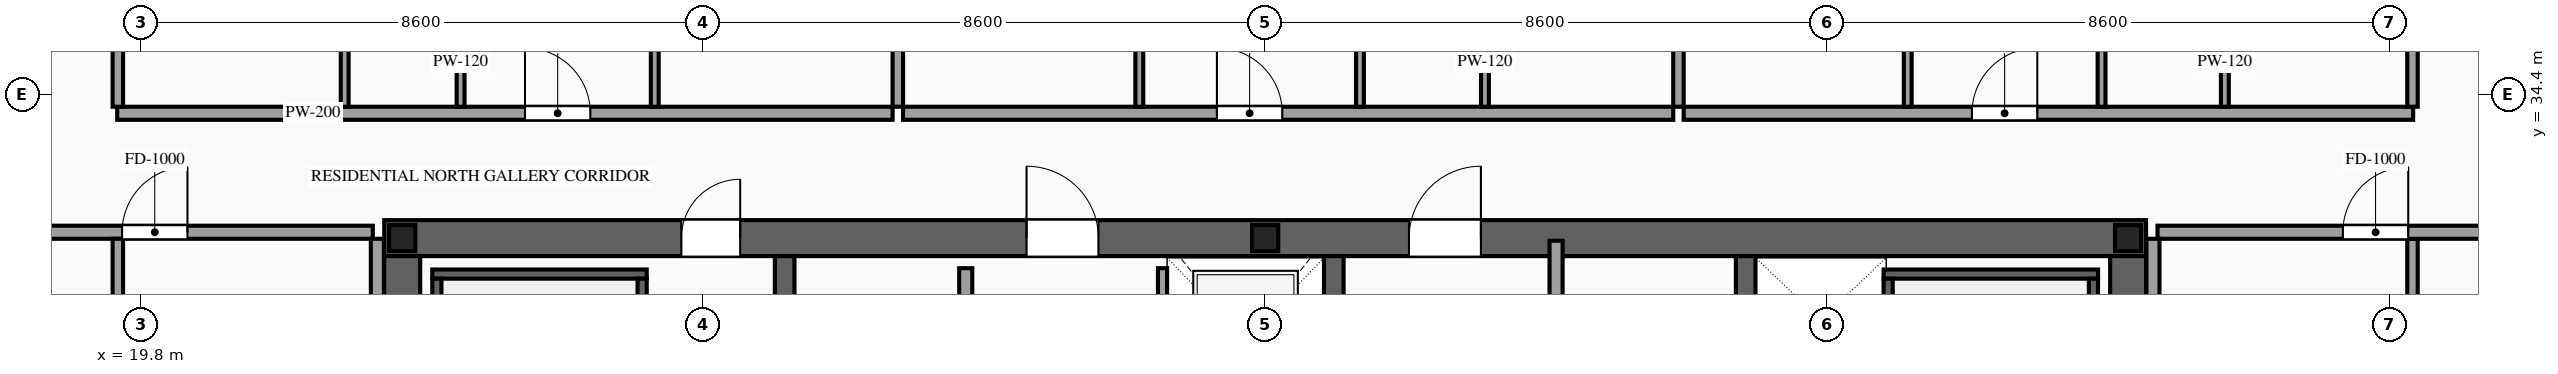
"""IFC4 building model, lengths in metres.
Left out: names, types, materials, properties, quantities, classifications, styles, units other than length and angle.
Written with IfcOpenShell. Run it as: python <this file> out.ifc"""

import sys

from ifc_helpers import new_model, si_unit, direction, frame, frame_2d, origin, origin_2d, place, context, subcontext, project, spatial, rectangle, i_section, extrude, source, transform, mapped, element, fill, save


model = new_model("IFC4")
c1 = context("Model", 3, precision=1e-05, world=origin(), true_north=direction((0.0, 1.0)))
c2 = subcontext(c1, "Body", "Model", "MODEL_VIEW")
j1 = project(units=[si_unit("LENGTHUNIT", "METRE"), si_unit("PLANEANGLEUNIT", "RADIAN")], contexts=[c1])
p1 = place(None, origin())
s1 = spatial("IfcSite", under=j1, at=p1, CompositionType="ELEMENT")
p2 = place(p1, origin())
s2 = spatial("IfcBuilding", under=s1, at=p2, CompositionType="ELEMENT")
p3 = place(p2, frame((0.0, 0.0, 245.1)))
s3 = spatial("IfcBuildingStorey", under=s2, at=p3, CompositionType="ELEMENT", Elevation=245.1)
p4 = place(p3, frame((23.525, 32.2, 0.0), z_axis=(0.0, 0.0, 1.0), x_axis=(1.0, 0.0, 0.0)))
e1 = element("IfcWall", 1, at=p4, inside=s3, PredefinedType="SHEAR", context=c2, shape_type="SweptSolid", body=[
    extrude(rectangle(XDim=26.95, YDim=0.55, at=frame_2d((13.475, 0.0))), origin(), (0.0, 0.0, 1.0), 3.5),
])
p5 = place(p4, frame((4.545, 0.0, 0.0)))
e2 = element("IfcOpeningElement", 2, at=p5, cuts=e1, PredefinedType="OPENING", context=c2, shape_type="SweptSolid", body=[
    extrude(rectangle(XDim=0.9, YDim=2.15, at=frame_2d((0.45, 1.075))), frame((0.0, 0.29, 0.0), z_axis=(0.0, -1.0, 0.0), x_axis=(1.0, 0.0, 0.0)), (0.0, 0.0, 1.0), 0.58),
])
p6 = place(p4, frame((9.825, 0.0, 0.0)))
e3 = element("IfcOpeningElement", 3, at=p6, cuts=e1, PredefinedType="OPENING", context=c2, shape_type="SweptSolid", body=[
    extrude(rectangle(XDim=1.1, YDim=2.2, at=frame_2d((0.55, 1.1))), frame((0.0, 0.29, 0.0), z_axis=(0.0, -1.0, 0.0), x_axis=(1.0, 0.0, 0.0)), (0.0, 0.0, 1.0), 0.58),
])
p7 = place(p4, frame((15.675, 0.0, 0.0)))
e4 = element("IfcOpeningElement", 4, at=p7, cuts=e1, PredefinedType="OPENING", context=c2, shape_type="SweptSolid", body=[
    extrude(rectangle(XDim=1.1, YDim=2.2, at=frame_2d((0.55, 1.1))), frame((0.0, 0.29, 0.0), z_axis=(0.0, -1.0, 0.0), x_axis=(1.0, 0.0, 0.0)), (0.0, 0.0, 1.0), 0.58),
])
m1 = source(origin(), c2, "Body", "SweptSolid", [
    extrude(rectangle(XDim=12.25, YDim=0.55, at=frame_2d((6.125, 0.0))), origin(), (0.0, 0.0, 1.0), 3.5),
])
for number, where, z_axis, x_axis in (
    (5, (23.8, 19.675, 0.0), (0.0, 0.0, 1.0), (0.0, 1.0, 0.0)),
    (6, (50.2, 19.675, 0.0), (0.0, 0.0, 1.0), (0.0, 1.0, 0.0)),
):
    element("IfcWall", number, at=place(p3, frame(where, z_axis=z_axis, x_axis=x_axis)), inside=s3, PredefinedType="SHEAR", context=c2, shape_type="MappedRepresentation", body=[
        mapped(m1, transform((0.0, 0.0, 0.0), scale=1.0)),
    ])
m2 = source(origin(), c2, "Body", "SweptSolid", [
    extrude(rectangle(XDim=12.25, YDim=0.3, at=frame_2d((6.125, 0.0))), origin(), (0.0, 0.0, 1.0), 3.5),
])
for number, where, z_axis, x_axis in (
    (7, (29.65, 19.675, 0.0), (0.0, 0.0, 1.0), (0.0, 1.0, 0.0)),
    (8, (38.05, 19.675, 0.0), (0.0, 0.0, 1.0), (0.0, 1.0, 0.0)),
    (9, (44.35, 19.675, 0.0), (0.0, 0.0, 1.0), (0.0, 1.0, 0.0)),
):
    element("IfcWall", number, at=place(p3, frame(where, z_axis=z_axis, x_axis=x_axis)), inside=s3, PredefinedType="SOLIDWALL", context=c2, shape_type="MappedRepresentation", body=[
        mapped(m2, transform((0.0, 0.0, 0.0), scale=1.0)),
    ])
m3 = source(origin(), c2, "Body", "SweptSolid", [
    extrude(i_section(OverallWidth=0.4, OverallDepth=0.4, WebThickness=0.013, FlangeThickness=0.021, at=origin_2d()), origin(), (0.0, 0.0, 1.0), 3.5),
])
for number, where, z_axis, x_axis in (
    (10, (23.8, 32.2, 0.0), (0.0, 0.0, 1.0), (1.0, 0.0, 0.0)),
    (11, (37.0, 32.2, 0.0), (0.0, 0.0, 1.0), (1.0, 0.0, 0.0)),
    (12, (50.2, 32.2, 0.0), (0.0, 0.0, 1.0), (1.0, 0.0, 0.0)),
):
    element("IfcColumn", number, at=place(p3, frame(where, z_axis=z_axis, x_axis=x_axis)), inside=s3, PredefinedType="COLUMN", context=c2, shape_type="MappedRepresentation", body=[
        mapped(m3, transform((0.0, 0.0, 0.0), scale=1.0)),
    ])
p8 = place(p3, frame((35.43, 29.4, 0.0), z_axis=(0.0, 0.0, 1.0), x_axis=(0.0, 1.0, 0.0)))
e13 = element("IfcWall", 13, at=p8, inside=s3, PredefinedType="SOLIDWALL", context=c2, shape_type="SweptSolid", body=[
    extrude(rectangle(XDim=2.34, YDim=0.14, at=frame_2d((1.17, 0.0))), origin(), (0.0, 0.0, 1.0), 3.28),
])
p9 = place(p8, frame((0.62, 0.0, 0.0)))
e14 = element("IfcOpeningElement", 14, at=p9, cuts=e13, PredefinedType="OPENING", context=c2, shape_type="SweptSolid", body=[
    extrude(rectangle(XDim=1.1, YDim=2.2, at=frame_2d((0.55, 1.1))), frame((0.0, 0.085, 0.0), z_axis=(0.0, -1.0, 0.0), x_axis=(1.0, 0.0, 0.0)), (0.0, 0.0, 1.0), 0.17),
])
m4 = source(origin(), c2, "Body", "SweptSolid", [
    extrude(rectangle(XDim=3.28, YDim=0.14, at=frame_2d((1.64, 0.0))), origin(), (0.0, 0.0, 1.0), 3.28),
])
p10 = place(p3, frame((24.26, 31.65, 0.0), z_axis=(0.0, 0.0, 1.0), x_axis=(1.0, 0.0, 0.0)))
e15 = element("IfcWall", 15, at=p10, inside=s3, PredefinedType="SOLIDWALL", context=c2, shape_type="MappedRepresentation", body=[
    mapped(m4, transform((0.0, 0.0, 0.0), scale=1.0)),
])
m5 = source(origin(), c2, "Body", "SweptSolid", [
    extrude(rectangle(XDim=8.94, YDim=0.14, at=frame_2d((4.47, 0.0))), origin(), (0.0, 0.0, 1.0), 3.28),
])
for number, where, z_axis, x_axis in (
    (16, (24.33, 22.64, 0.0), (0.0, 0.0, 1.0), (0.0, 1.0, 0.0)),
    (17, (27.47, 22.64, 0.0), (0.0, 0.0, 1.0), (0.0, 1.0, 0.0)),
):
    element("IfcWall", number, at=place(p3, frame(where, z_axis=z_axis, x_axis=x_axis)), inside=s3, PredefinedType="SOLIDWALL", context=c2, shape_type="MappedRepresentation", body=[
        mapped(m5, transform((0.0, 0.0, 0.0), scale=1.0)),
    ])
p11 = place(p3, frame((46.46, 31.65, 0.0), z_axis=(0.0, 0.0, 1.0), x_axis=(1.0, 0.0, 0.0)))
e18 = element("IfcWall", 18, at=p11, inside=s3, PredefinedType="SOLIDWALL", context=c2, shape_type="MappedRepresentation", body=[
    mapped(m4, transform((0.0, 0.0, 0.0), scale=1.0)),
])
for number, where, z_axis, x_axis in (
    (19, (46.53, 22.64, 0.0), (0.0, 0.0, 1.0), (0.0, 1.0, 0.0)),
    (20, (49.67, 22.64, 0.0), (0.0, 0.0, 1.0), (0.0, 1.0, 0.0)),
):
    element("IfcWall", number, at=place(p3, frame(where, z_axis=z_axis, x_axis=x_axis)), inside=s3, PredefinedType="SOLIDWALL", context=c2, shape_type="MappedRepresentation", body=[
        mapped(m5, transform((0.0, 0.0, 0.0), scale=1.0)),
    ])
p12 = place(p3, frame((32.42, 19.86, 0.0), z_axis=(0.0, 0.0, 1.0), x_axis=(0.0, 1.0, 0.0)))
e21 = element("IfcWall", 21, at=p12, inside=s3, PredefinedType="PARTITIONING", context=c2, shape_type="SweptSolid", body=[
    extrude(rectangle(XDim=11.88, YDim=0.2, at=frame_2d((5.94, 0.0))), origin(), (0.0, 0.0, 1.0), 3.28),
])
p13 = place(p12, frame((5.49, 0.0, 0.0)))
e22 = element("IfcOpeningElement", 22, at=p13, cuts=e21, PredefinedType="OPENING", context=c2, shape_type="SweptSolid", body=[
    extrude(rectangle(XDim=0.9, YDim=2.15, at=frame_2d((0.45, 1.075))), frame((0.0, 0.115, 0.0), z_axis=(0.0, -1.0, 0.0), x_axis=(1.0, 0.0, 0.0)), (0.0, 0.0, 1.0), 0.23),
])
m6 = source(origin(), c2, "Body", "SweptSolid", [
    extrude(rectangle(XDim=12.72, YDim=0.2, at=frame_2d((6.36, 0.0))), origin(), (0.0, 0.0, 1.0), 3.28),
])
p14 = place(p3, frame((41.45, 19.44, 0.0), z_axis=(0.0, 0.0, 1.0), x_axis=(0.0, 1.0, 0.0)))
e23 = element("IfcWall", 23, at=p14, inside=s3, PredefinedType="PARTITIONING", context=c2, shape_type="MappedRepresentation", body=[
    mapped(m6, transform((0.0, 0.0, 0.0), scale=1.0)),
])
p15 = place(p3, frame((19.44, 34.11, 0.0), z_axis=(0.0, 0.0, 1.0), x_axis=(1.0, 0.0, 0.0)))
e24 = element("IfcWall", 24, at=p15, inside=s3, PredefinedType="PARTITIONING", context=c2, shape_type="SweptSolid", body=[
    extrude(rectangle(XDim=11.861, YDim=0.2, at=frame_2d((5.931, 0.0))), origin(), (0.0, 0.0, 1.0), 3.28),
])
p16 = place(p15, frame((6.238, 0.0, 0.0)))
e25 = element("IfcOpeningElement", 25, at=p16, cuts=e24, PredefinedType="OPENING", context=c2, shape_type="SweptSolid", body=[
    extrude(rectangle(XDim=1.0, YDim=2.2, at=frame_2d((0.5, 1.1))), frame((0.0, 0.115, 0.0), z_axis=(0.0, -1.0, 0.0), x_axis=(1.0, 0.0, 0.0)), (0.0, 0.0, 1.0), 0.23),
])
m7 = source(origin(), c2, "Body", "SweptSolid", [
    extrude(rectangle(XDim=12.04, YDim=0.16, at=frame_2d((6.02, 0.0))), origin(), (0.0, 0.0, 1.0), 3.28),
])
p17 = place(p3, frame((31.381, 34.21, 0.0), z_axis=(0.0, 0.0, 1.0), x_axis=(0.0, 1.0, 0.0)))
e26 = element("IfcWall", 26, at=p17, inside=s3, PredefinedType="PARTITIONING", context=c2, shape_type="MappedRepresentation", body=[
    mapped(m7, transform((0.0, 0.0, 0.0), scale=1.0)),
])
m8 = source(origin(), c2, "Body", "SweptSolid", [
    extrude(rectangle(XDim=4.11, YDim=0.12, at=frame_2d((2.055, 0.0))), origin(), (0.0, 0.0, 1.0), 3.28),
])
p18 = place(p3, frame((22.92, 34.21, 0.0), z_axis=(0.0, 0.0, 1.0), x_axis=(0.0, 1.0, 0.0)))
e27 = element("IfcWall", 27, at=p18, inside=s3, PredefinedType="PARTITIONING", context=c2, shape_type="MappedRepresentation", body=[
    mapped(m8, transform((0.0, 0.0, 0.0), scale=1.0)),
])
p19 = place(p3, frame((24.693, 34.21, 0.0), z_axis=(0.0, 0.0, 1.0), x_axis=(0.0, 1.0, 0.0)))
e28 = element("IfcWall", 28, at=p19, inside=s3, PredefinedType="PARTITIONING", context=c2, shape_type="SweptSolid", body=[
    extrude(rectangle(XDim=4.11, YDim=0.12, at=frame_2d((2.055, 0.0))), origin(), (0.0, 0.0, 1.0), 3.28),
])
p20 = place(p19, frame((1.63, 0.0, 0.0)))
e29 = element("IfcOpeningElement", 29, at=p20, cuts=e28, PredefinedType="OPENING", context=c2, shape_type="SweptSolid", body=[
    extrude(rectangle(XDim=0.85, YDim=2.1, at=frame_2d((0.425, 1.05))), frame((0.0, 0.075, 0.0), z_axis=(0.0, -1.0, 0.0), x_axis=(1.0, 0.0, 0.0)), (0.0, 0.0, 1.0), 0.15),
])
p21 = place(p3, frame((27.663, 34.21, 0.0), z_axis=(0.0, 0.0, 1.0), x_axis=(0.0, 1.0, 0.0)))
e30 = element("IfcWall", 30, at=p21, inside=s3, PredefinedType="PARTITIONING", context=c2, shape_type="MappedRepresentation", body=[
    mapped(m8, transform((0.0, 0.0, 0.0), scale=1.0)),
])
p22 = place(p3, frame((31.461, 34.11, 0.0), z_axis=(0.0, 0.0, 1.0), x_axis=(1.0, 0.0, 0.0)))
e31 = element("IfcWall", 31, at=p22, inside=s3, PredefinedType="PARTITIONING", context=c2, shape_type="SweptSolid", body=[
    extrude(rectangle(XDim=11.781, YDim=0.2, at=frame_2d((5.891, 0.0))), origin(), (0.0, 0.0, 1.0), 3.28),
])
p23 = place(p22, frame((4.801, 0.0, 0.0)))
e32 = element("IfcOpeningElement", 32, at=p23, cuts=e31, PredefinedType="OPENING", context=c2, shape_type="SweptSolid", body=[
    extrude(rectangle(XDim=1.0, YDim=2.2, at=frame_2d((0.5, 1.1))), frame((0.0, 0.115, 0.0), z_axis=(0.0, -1.0, 0.0), x_axis=(1.0, 0.0, 0.0)), (0.0, 0.0, 1.0), 0.23),
])
p24 = place(p3, frame((43.322, 34.21, 0.0), z_axis=(0.0, 0.0, 1.0), x_axis=(0.0, 1.0, 0.0)))
e33 = element("IfcWall", 33, at=p24, inside=s3, PredefinedType="PARTITIONING", context=c2, shape_type="MappedRepresentation", body=[
    mapped(m7, transform((0.0, 0.0, 0.0), scale=1.0)),
])
p25 = place(p3, frame((35.075, 34.21, 0.0), z_axis=(0.0, 0.0, 1.0), x_axis=(0.0, 1.0, 0.0)))
e34 = element("IfcWall", 34, at=p25, inside=s3, PredefinedType="PARTITIONING", context=c2, shape_type="MappedRepresentation", body=[
    mapped(m8, transform((0.0, 0.0, 0.0), scale=1.0)),
])
p26 = place(p3, frame((40.362, 34.21, 0.0), z_axis=(0.0, 0.0, 1.0), x_axis=(0.0, 1.0, 0.0)))
e35 = element("IfcWall", 35, at=p26, inside=s3, PredefinedType="PARTITIONING", context=c2, shape_type="SweptSolid", body=[
    extrude(rectangle(XDim=4.11, YDim=0.12, at=frame_2d((2.055, 0.0))), origin(), (0.0, 0.0, 1.0), 3.28),
])
p27 = place(p26, frame((1.63, 0.0, 0.0)))
e36 = element("IfcOpeningElement", 36, at=p27, cuts=e35, PredefinedType="OPENING", context=c2, shape_type="SweptSolid", body=[
    extrude(rectangle(XDim=0.85, YDim=2.1, at=frame_2d((0.425, 1.05))), frame((0.0, 0.075, 0.0), z_axis=(0.0, -1.0, 0.0), x_axis=(1.0, 0.0, 0.0)), (0.0, 0.0, 1.0), 0.15),
])
p28 = place(p3, frame((38.45, 34.21, 0.0), z_axis=(0.0, 0.0, 1.0), x_axis=(0.0, 1.0, 0.0)))
e37 = element("IfcWall", 37, at=p28, inside=s3, PredefinedType="PARTITIONING", context=c2, shape_type="SweptSolid", body=[
    extrude(rectangle(XDim=4.11, YDim=0.12, at=frame_2d((2.055, 0.0))), origin(), (0.0, 0.0, 1.0), 3.28),
])
p29 = place(p28, frame((1.63, 0.0, 0.0)))
e38 = element("IfcOpeningElement", 38, at=p29, cuts=e37, PredefinedType="OPENING", context=c2, shape_type="SweptSolid", body=[
    extrude(rectangle(XDim=0.85, YDim=2.1, at=frame_2d((0.425, 1.05))), frame((0.0, 0.075, 0.0), z_axis=(0.0, -1.0, 0.0), x_axis=(1.0, 0.0, 0.0)), (0.0, 0.0, 1.0), 0.15),
])
p30 = place(p3, frame((43.402, 34.11, 0.0), z_axis=(0.0, 0.0, 1.0), x_axis=(1.0, 0.0, 0.0)))
e39 = element("IfcWall", 39, at=p30, inside=s3, PredefinedType="PARTITIONING", context=c2, shape_type="SweptSolid", body=[
    extrude(rectangle(XDim=11.158, YDim=0.2, at=frame_2d((5.579, 0.0))), origin(), (0.0, 0.0, 1.0), 3.28),
])
p31 = place(p30, frame((4.409, 0.0, 0.0)))
e40 = element("IfcOpeningElement", 40, at=p31, cuts=e39, PredefinedType="OPENING", context=c2, shape_type="SweptSolid", body=[
    extrude(rectangle(XDim=1.0, YDim=2.2, at=frame_2d((0.5, 1.1))), frame((0.0, 0.115, 0.0), z_axis=(0.0, -1.0, 0.0), x_axis=(1.0, 0.0, 0.0)), (0.0, 0.0, 1.0), 0.23),
])
m9 = source(origin(), c2, "Body", "SweptSolid", [
    extrude(rectangle(XDim=11.89, YDim=0.16, at=frame_2d((5.945, 0.0))), origin(), (0.0, 0.0, 1.0), 3.28),
])
for number, where, z_axis, x_axis in (
    (41, (19.45, 34.21, 0.0), (0.0, 0.0, 1.0), (0.0, 1.0, 0.0)),
    (42, (54.55, 34.21, 0.0), (0.0, 0.0, 1.0), (0.0, 1.0, 0.0)),
):
    element("IfcWall", number, at=place(p3, frame(where, z_axis=z_axis, x_axis=x_axis)), inside=s3, PredefinedType="PARTITIONING", context=c2, shape_type="MappedRepresentation", body=[
        mapped(m9, transform((0.0, 0.0, 0.0), scale=1.0)),
    ])
p32 = place(p3, frame((46.829, 34.21, 0.0), z_axis=(0.0, 0.0, 1.0), x_axis=(0.0, 1.0, 0.0)))
e43 = element("IfcWall", 43, at=p32, inside=s3, PredefinedType="PARTITIONING", context=c2, shape_type="MappedRepresentation", body=[
    mapped(m8, transform((0.0, 0.0, 0.0), scale=1.0)),
])
p33 = place(p3, frame((51.68, 34.21, 0.0), z_axis=(0.0, 0.0, 1.0), x_axis=(0.0, 1.0, 0.0)))
e44 = element("IfcWall", 44, at=p33, inside=s3, PredefinedType="PARTITIONING", context=c2, shape_type="SweptSolid", body=[
    extrude(rectangle(XDim=4.11, YDim=0.12, at=frame_2d((2.055, 0.0))), origin(), (0.0, 0.0, 1.0), 3.28),
])
p34 = place(p33, frame((1.63, 0.0, 0.0)))
e45 = element("IfcOpeningElement", 45, at=p34, cuts=e44, PredefinedType="OPENING", context=c2, shape_type="SweptSolid", body=[
    extrude(rectangle(XDim=0.85, YDim=2.1, at=frame_2d((0.425, 1.05))), frame((0.0, 0.075, 0.0), z_axis=(0.0, -1.0, 0.0), x_axis=(1.0, 0.0, 0.0)), (0.0, 0.0, 1.0), 0.15),
])
p35 = place(p3, frame((49.794, 34.21, 0.0), z_axis=(0.0, 0.0, 1.0), x_axis=(0.0, 1.0, 0.0)))
e46 = element("IfcWall", 46, at=p35, inside=s3, PredefinedType="PARTITIONING", context=c2, shape_type="SweptSolid", body=[
    extrude(rectangle(XDim=4.11, YDim=0.12, at=frame_2d((2.055, 0.0))), origin(), (0.0, 0.0, 1.0), 3.28),
])
p36 = place(p35, frame((1.63, 0.0, 0.0)))
e47 = element("IfcOpeningElement", 47, at=p36, cuts=e46, PredefinedType="OPENING", context=c2, shape_type="SweptSolid", body=[
    extrude(rectangle(XDim=0.85, YDim=2.1, at=frame_2d((0.425, 1.05))), frame((0.0, 0.075, 0.0), z_axis=(0.0, -1.0, 0.0), x_axis=(1.0, 0.0, 0.0)), (0.0, 0.0, 1.0), 0.15),
])
p37 = place(p3, frame((16.55, 32.29, 0.0), z_axis=(0.0, 0.0, 1.0), x_axis=(1.0, 0.0, 0.0)))
e48 = element("IfcWall", 48, at=p37, inside=s3, PredefinedType="PARTITIONING", context=c2, shape_type="SweptSolid", body=[
    extrude(rectangle(XDim=6.8, YDim=0.2, at=frame_2d((3.4, 0.0))), origin(), (0.0, 0.0, 1.0), 2.825),
])
p38 = place(p37, frame((2.965, 0.0, 0.0)))
e49 = element("IfcOpeningElement", 49, at=p38, cuts=e48, PredefinedType="OPENING", context=c2, shape_type="SweptSolid", body=[
    extrude(rectangle(XDim=1.0, YDim=2.2, at=frame_2d((0.5, 1.1))), frame((0.0, 0.115, 0.0), z_axis=(0.0, -1.0, 0.0), x_axis=(1.0, 0.0, 0.0)), (0.0, 0.0, 1.0), 0.23),
])
m10 = source(origin(), c2, "Body", "SweptSolid", [
    extrude(rectangle(XDim=26.69, YDim=0.16, at=frame_2d((13.345, 0.0))), origin(), (0.0, 0.0, 1.0), 3.28),
])
for number, where, z_axis, x_axis in (
    (50, (19.45, 5.5, 0.0), (0.0, 0.0, 1.0), (0.0, 1.0, 0.0)),
    (51, (54.55, 5.5, 0.0), (0.0, 0.0, 1.0), (0.0, 1.0, 0.0)),
):
    element("IfcWall", number, at=place(p3, frame(where, z_axis=z_axis, x_axis=x_axis)), inside=s3, PredefinedType="PARTITIONING", context=c2, shape_type="MappedRepresentation", body=[
        mapped(m10, transform((0.0, 0.0, 0.0), scale=1.0)),
    ])
m11 = source(origin(), c2, "Body", "SweptSolid", [
    extrude(rectangle(XDim=6.29, YDim=0.2, at=frame_2d((3.145, 0.0))), origin(), (0.0, 0.0, 1.0), 3.28),
])
p39 = place(p3, frame((23.42, 25.9, 0.0), z_axis=(0.0, 0.0, 1.0), x_axis=(0.0, 1.0, 0.0)))
e52 = element("IfcWall", 52, at=p39, inside=s3, PredefinedType="PARTITIONING", context=c2, shape_type="MappedRepresentation", body=[
    mapped(m11, transform((0.0, 0.0, 0.0), scale=1.0)),
])
p40 = place(p3, frame((50.65, 32.29, 0.0), z_axis=(0.0, 0.0, 1.0), x_axis=(1.0, 0.0, 0.0)))
e53 = element("IfcWall", 53, at=p40, inside=s3, PredefinedType="PARTITIONING", context=c2, shape_type="SweptSolid", body=[
    extrude(rectangle(XDim=6.8, YDim=0.2, at=frame_2d((3.4, 0.0))), origin(), (0.0, 0.0, 1.0), 2.825),
])
p41 = place(p40, frame((2.835, 0.0, 0.0)))
e54 = element("IfcOpeningElement", 54, at=p41, cuts=e53, PredefinedType="OPENING", context=c2, shape_type="SweptSolid", body=[
    extrude(rectangle(XDim=1.0, YDim=2.2, at=frame_2d((0.5, 1.1))), frame((0.0, 0.115, 0.0), z_axis=(0.0, -1.0, 0.0), x_axis=(1.0, 0.0, 0.0)), (0.0, 0.0, 1.0), 0.23),
])
p42 = place(p3, frame((50.58, 25.9, 0.0), z_axis=(0.0, 0.0, 1.0), x_axis=(0.0, 1.0, 0.0)))
e55 = element("IfcWall", 55, at=p42, inside=s3, PredefinedType="PARTITIONING", context=c2, shape_type="MappedRepresentation", body=[
    mapped(m11, transform((0.0, 0.0, 0.0), scale=1.0)),
])
m12 = source(origin(), c2, "Body", "SweptSolid", [
    extrude(rectangle(XDim=0.9, YDim=2.15, at=frame_2d((0.45, 1.075))), frame((0.0, 0.025, 0.0), z_axis=(0.0, -1.0, 0.0), x_axis=(1.0, 0.0, 0.0)), (0.0, 0.0, 1.0), 0.05),
])
p43 = place(p5, origin())
e56 = element("IfcDoor", 56, at=p43, inside=s3, OperationType="SINGLE_SWING_RIGHT", PredefinedType="DOOR", context=c2, shape_type="MappedRepresentation", body=[
    mapped(m12, transform((0.0, 0.0, 0.0), scale=1.0)),
])
fill(e2, e56)
m13 = source(origin(), c2, "Body", "SweptSolid", [
    extrude(rectangle(XDim=1.1, YDim=2.2, at=frame_2d((0.55, 1.1))), frame((0.0, 0.025, 0.0), z_axis=(0.0, -1.0, 0.0), x_axis=(1.0, 0.0, 0.0)), (0.0, 0.0, 1.0), 0.05),
])
p44 = place(p6, origin())
e57 = element("IfcDoor", 57, at=p44, inside=s3, OperationType="SINGLE_SWING_LEFT", PredefinedType="DOOR", context=c2, shape_type="MappedRepresentation", body=[
    mapped(m13, transform((0.0, 0.0, 0.0), scale=1.0)),
])
fill(e3, e57)
p45 = place(p7, origin())
e58 = element("IfcDoor", 58, at=p45, inside=s3, OperationType="SINGLE_SWING_RIGHT", PredefinedType="DOOR", context=c2, shape_type="MappedRepresentation", body=[
    mapped(m13, transform((0.0, 0.0, 0.0), scale=1.0)),
])
fill(e4, e58)
m14 = source(origin(), c2, "Body", "SweptSolid", [
    extrude(rectangle(XDim=1.0, YDim=2.2, at=frame_2d((0.5, 1.1))), frame((0.0, 0.025, 0.0), z_axis=(0.0, -1.0, 0.0), x_axis=(1.0, 0.0, 0.0)), (0.0, 0.0, 1.0), 0.05),
])
p46 = place(p16, origin())
e59 = element("IfcDoor", 59, at=p46, inside=s3, OperationType="SINGLE_SWING_LEFT", PredefinedType="DOOR", context=c2, shape_type="MappedRepresentation", body=[
    mapped(m14, transform((0.0, 0.0, 0.0), scale=1.0)),
])
fill(e25, e59)
p47 = place(p23, origin())
e60 = element("IfcDoor", 60, at=p47, inside=s3, OperationType="SINGLE_SWING_LEFT", PredefinedType="DOOR", context=c2, shape_type="MappedRepresentation", body=[
    mapped(m14, transform((0.0, 0.0, 0.0), scale=1.0)),
])
fill(e32, e60)
p48 = place(p31, origin())
e61 = element("IfcDoor", 61, at=p48, inside=s3, OperationType="SINGLE_SWING_RIGHT", PredefinedType="DOOR", context=c2, shape_type="MappedRepresentation", body=[
    mapped(m14, transform((0.0, 0.0, 0.0), scale=1.0)),
])
fill(e40, e61)
p49 = place(p38, origin())
e62 = element("IfcDoor", 62, at=p49, inside=s3, OperationType="SINGLE_SWING_RIGHT", PredefinedType="DOOR", context=c2, shape_type="MappedRepresentation", body=[
    mapped(m14, transform((0.0, 0.0, 0.0), scale=1.0)),
])
fill(e49, e62)
p50 = place(p41, origin())
e63 = element("IfcDoor", 63, at=p50, inside=s3, OperationType="SINGLE_SWING_RIGHT", PredefinedType="DOOR", context=c2, shape_type="MappedRepresentation", body=[
    mapped(m14, transform((0.0, 0.0, 0.0), scale=1.0)),
])
fill(e54, e63)
save(model, sys.argv[1])
